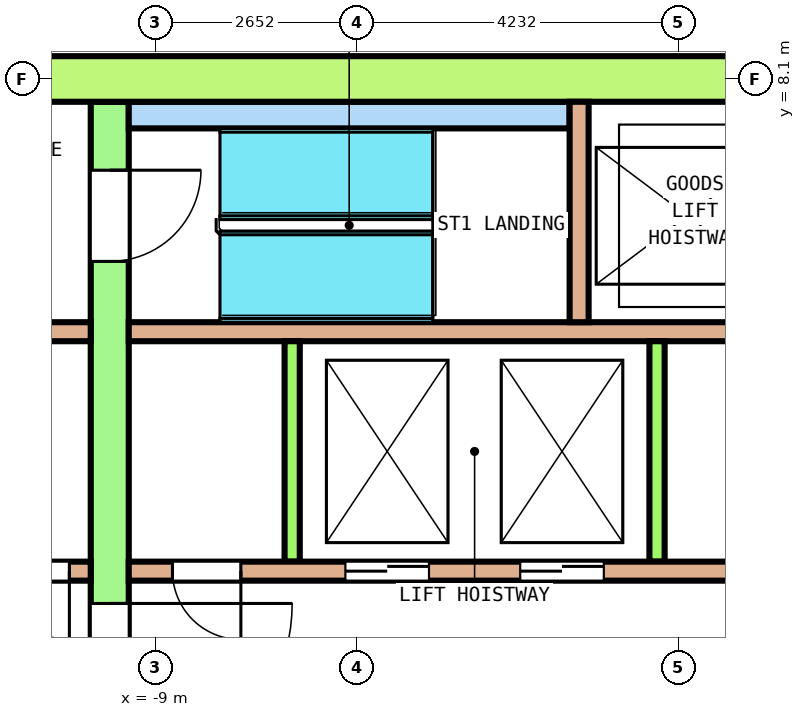
"""IFC4 building model, lengths in metres.
Left out: names, types, materials, properties, quantities, classifications, styles, units other than length and angle.
Written with IfcOpenShell. Run it as: python <this file> out.ifc"""

import sys

from ifc_helpers import new_model, si_unit, direction, frame, frame_2d, origin, place, context, subcontext, project, spatial, rectangle, extrude, element, fill, save


model = new_model("IFC4")
c1 = context("Model", 3, precision=1e-05, world=origin(), true_north=direction((0.0, 1.0)))
c2 = subcontext(c1, "Body", "Model", "MODEL_VIEW")
j1 = project(units=[si_unit("LENGTHUNIT", "METRE"), si_unit("PLANEANGLEUNIT", "RADIAN")], contexts=[c1])
p1 = place(None, origin())
s1 = spatial("IfcSite", under=j1, at=p1, CompositionType="ELEMENT")
p2 = place(p1, origin())
s2 = spatial("IfcBuilding", under=s1, at=p2, CompositionType="ELEMENT")
p3 = place(p2, frame((0.0, 0.0, 223.4)))
s3 = spatial("IfcBuildingStorey", under=s2, at=p3, CompositionType="ELEMENT", Elevation=223.4)
p4 = place(p3, frame((-13.5, 8.1, 0.0), z_axis=(0.0, 0.0, 1.0), x_axis=(1.0, 0.0, 0.0)))
e1 = element("IfcWall", 1, at=p4, inside=s3, PredefinedType="SHEAR", context=c2, shape_type="SweptSolid", body=[
    extrude(rectangle(XDim=27.0, YDim=0.6, at=frame_2d((13.5, 0.0))), origin(), (0.0, 0.0, 1.0), 3.7),
])
p5 = place(p4, frame((14.425, 0.0, 0.0)))
e2 = element("IfcOpeningElement", 2, at=p5, cuts=e1, PredefinedType="OPENING", context=c2, shape_type="SweptSolid", body=[
    extrude(rectangle(XDim=1.4, YDim=2.1, at=frame_2d((0.7, 1.05))), frame((0.0, 0.31, 0.0), z_axis=(0.0, -1.0, 0.0), x_axis=(1.0, 0.0, 0.0)), (0.0, 0.0, 1.0), 0.62),
])
p6 = place(p3, frame((-9.6, -7.8, 0.0), z_axis=(0.0, 0.0, 1.0), x_axis=(0.0, 1.0, 0.0)))
e3 = element("IfcWall", 3, at=p6, inside=s3, PredefinedType="SHEAR", context=c2, shape_type="SweptSolid", body=[
    extrude(rectangle(XDim=15.6, YDim=0.5, at=frame_2d((7.8, 0.0))), origin(), (0.0, 0.0, 1.0), 3.7),
])
p7 = place(p6, frame((6.6, 0.0, 0.0)))
e4 = element("IfcOpeningElement", 4, at=p7, cuts=e3, PredefinedType="OPENING", context=c2, shape_type="SweptSolid", body=[
    extrude(rectangle(XDim=2.4, YDim=2.1, at=frame_2d((1.2, 1.05))), frame((0.0, 0.26, 0.0), z_axis=(0.0, -1.0, 0.0), x_axis=(1.0, 0.0, 0.0)), (0.0, 0.0, 1.0), 0.52),
])
p8 = place(p6, frame((13.5, 0.0, 0.0)))
e5 = element("IfcOpeningElement", 5, at=p8, cuts=e3, PredefinedType="OPENING", context=c2, shape_type="SweptSolid", body=[
    extrude(rectangle(XDim=1.2, YDim=2.1, at=frame_2d((0.6, 1.05))), frame((0.0, 0.26, 0.0), z_axis=(0.0, -1.0, 0.0), x_axis=(1.0, 0.0, 0.0)), (0.0, 0.0, 1.0), 0.52),
])
p9 = place(p6, frame((0.9, 0.0, 0.0)))
e6 = element("IfcOpeningElement", 6, at=p9, cuts=e3, PredefinedType="OPENING", context=c2, shape_type="SweptSolid", body=[
    extrude(rectangle(XDim=1.2, YDim=2.1, at=frame_2d((0.6, 1.05))), frame((0.0, 0.26, 0.0), z_axis=(0.0, -1.0, 0.0), x_axis=(1.0, 0.0, 0.0)), (0.0, 0.0, 1.0), 0.52),
])
p10 = place(p3, frame((-12.9, 1.625, 0.0), z_axis=(0.0, 0.0, 1.0), x_axis=(1.0, 0.0, 0.0)))
e7 = element("IfcWall", 7, at=p10, inside=s3, PredefinedType="SOLIDWALL", context=c2, shape_type="SweptSolid", body=[
    extrude(rectangle(XDim=3.05, YDim=0.25, at=frame_2d((1.525, 0.0))), origin(), (0.0, 0.0, 1.0), 3.7),
])
p11 = place(p10, frame((0.281, 0.0, 0.0)))
e8 = element("IfcOpeningElement", 8, at=p11, cuts=e7, PredefinedType="OPENING", context=c2, shape_type="SweptSolid", body=[
    extrude(rectangle(XDim=0.9, YDim=2.1, at=frame_2d((0.45, 1.05))), frame((0.0, 0.135, 0.0), z_axis=(0.0, -1.0, 0.0), x_axis=(1.0, 0.0, 0.0)), (0.0, 0.0, 1.0), 0.27),
])
p12 = place(p10, frame((1.869, 0.0, 0.0)))
e9 = element("IfcOpeningElement", 9, at=p12, cuts=e7, PredefinedType="OPENING", context=c2, shape_type="SweptSolid", body=[
    extrude(rectangle(XDim=0.9, YDim=2.1, at=frame_2d((0.45, 1.05))), frame((0.0, 0.135, 0.0), z_axis=(0.0, -1.0, 0.0), x_axis=(1.0, 0.0, 0.0)), (0.0, 0.0, 1.0), 0.27),
])
p13 = place(p3, frame((-9.35, 1.625, 0.0), z_axis=(0.0, 0.0, 1.0), x_axis=(1.0, 0.0, 0.0)))
e10 = element("IfcWall", 10, at=p13, inside=s3, PredefinedType="SOLIDWALL", context=c2, shape_type="SweptSolid", body=[
    extrude(rectangle(XDim=18.7, YDim=0.25, at=frame_2d((9.35, 0.0))), origin(), (0.0, 0.0, 1.0), 3.7),
])
p14 = place(p13, frame((2.85, 0.0, 0.0)))
e11 = element("IfcOpeningElement", 11, at=p14, cuts=e10, PredefinedType="OPENING", context=c2, shape_type="SweptSolid", body=[
    extrude(rectangle(XDim=1.1, YDim=2.1, at=frame_2d((0.55, 1.05))), frame((0.0, 0.135, 0.0), z_axis=(0.0, -1.0, 0.0), x_axis=(1.0, 0.0, 0.0)), (0.0, 0.0, 1.0), 0.27),
])
p15 = place(p13, frame((5.15, 0.0, 0.0)))
e12 = element("IfcOpeningElement", 12, at=p15, cuts=e10, PredefinedType="OPENING", context=c2, shape_type="SweptSolid", body=[
    extrude(rectangle(XDim=1.1, YDim=2.1, at=frame_2d((0.55, 1.05))), frame((0.0, 0.135, 0.0), z_axis=(0.0, -1.0, 0.0), x_axis=(1.0, 0.0, 0.0)), (0.0, 0.0, 1.0), 0.27),
])
p16 = place(p13, frame((14.8, 0.0, 0.0)))
e13 = element("IfcOpeningElement", 13, at=p16, cuts=e10, PredefinedType="OPENING", context=c2, shape_type="SweptSolid", body=[
    extrude(rectangle(XDim=1.1, YDim=2.1, at=frame_2d((0.55, 1.05))), frame((0.0, 0.135, 0.0), z_axis=(0.0, -1.0, 0.0), x_axis=(1.0, 0.0, 0.0)), (0.0, 0.0, 1.0), 0.27),
])
p17 = place(p13, frame((0.575, 0.0, 0.0)))
e14 = element("IfcOpeningElement", 14, at=p17, cuts=e10, PredefinedType="OPENING", context=c2, shape_type="SweptSolid", body=[
    extrude(rectangle(XDim=0.9, YDim=2.1, at=frame_2d((0.45, 1.05))), frame((0.0, 0.135, 0.0), z_axis=(0.0, -1.0, 0.0), x_axis=(1.0, 0.0, 0.0)), (0.0, 0.0, 1.0), 0.27),
])
p18 = place(p13, frame((17.225, 0.0, 0.0)))
e15 = element("IfcOpeningElement", 15, at=p18, cuts=e10, PredefinedType="OPENING", context=c2, shape_type="SweptSolid", body=[
    extrude(rectangle(XDim=0.9, YDim=2.1, at=frame_2d((0.45, 1.05))), frame((0.0, 0.135, 0.0), z_axis=(0.0, -1.0, 0.0), x_axis=(1.0, 0.0, 0.0)), (0.0, 0.0, 1.0), 0.27),
])
p19 = place(p3, frame((-12.9, 4.775, 0.0), z_axis=(0.0, 0.0, 1.0), x_axis=(1.0, 0.0, 0.0)))
e16 = element("IfcWall", 16, at=p19, inside=s3, PredefinedType="SOLIDWALL", context=c2, shape_type="SweptSolid", body=[
    extrude(rectangle(XDim=3.05, YDim=0.25, at=frame_2d((1.525, 0.0))), origin(), (0.0, 0.0, 1.0), 3.7),
])
p20 = place(p3, frame((-9.35, 4.775, 0.0), z_axis=(0.0, 0.0, 1.0), x_axis=(1.0, 0.0, 0.0)))
e17 = element("IfcWall", 17, at=p20, inside=s3, PredefinedType="SOLIDWALL", context=c2, shape_type="SweptSolid", body=[
    extrude(rectangle(XDim=18.7, YDim=0.25, at=frame_2d((9.35, 0.0))), origin(), (0.0, 0.0, 1.0), 3.7),
])
for number, where, z_axis, x_axis in (
    (18, (-7.2, 1.75, 0.0), (0.0, 0.0, 1.0), (0.0, 1.0, 0.0)),
    (19, (-2.4, 1.75, 0.0), (0.0, 0.0, 1.0), (0.0, 1.0, 0.0)),
):
    element("IfcWall", number, at=place(p3, frame(where, z_axis=z_axis, x_axis=x_axis)), inside=s3, PredefinedType="SOLIDWALL", context=c2, shape_type="SweptSolid", body=[
        extrude(rectangle(XDim=2.9, YDim=0.2, at=frame_2d((1.45, 0.0))), origin(), (0.0, 0.0, 1.0), 3.7),
    ])
p21 = place(p3, frame((-9.35, 7.625, 0.0), z_axis=(0.0, 0.0, 1.0), x_axis=(1.0, 0.0, 0.0)))
e20 = element("IfcWall", 20, at=p21, inside=s3, PredefinedType="SOLIDWALL", context=c2, shape_type="SweptSolid", body=[
    extrude(rectangle(XDim=5.8, YDim=0.35, at=frame_2d((2.9, 0.0))), origin(), (0.0, 0.0, 1.0), 3.7),
])
p22 = place(p3, frame((-3.425, 4.9, 0.0), z_axis=(0.0, 0.0, 1.0), x_axis=(0.0, 1.0, 0.0)))
e21 = element("IfcWall", 21, at=p22, inside=s3, PredefinedType="SOLIDWALL", context=c2, shape_type="SweptSolid", body=[
    extrude(rectangle(XDim=2.9, YDim=0.25, at=frame_2d((1.45, 0.0))), origin(), (0.0, 0.0, 1.0), 3.7),
])
p23 = place(p14, origin())
e22 = element("IfcDoor", 22, at=p23, inside=s3, OperationType="DOUBLE_DOOR_SLIDING", PredefinedType="DOOR", context=c2, shape_type="SweptSolid", body=[
    extrude(rectangle(XDim=1.1, YDim=2.1, at=frame_2d((0.55, 1.05))), frame((0.0, 0.075, 0.0), z_axis=(0.0, -1.0, 0.0), x_axis=(1.0, 0.0, 0.0)), (0.0, 0.0, 1.0), 0.15),
])
fill(e11, e22)
p24 = place(p15, origin())
e23 = element("IfcDoor", 23, at=p24, inside=s3, OperationType="DOUBLE_DOOR_SLIDING", PredefinedType="DOOR", context=c2, shape_type="SweptSolid", body=[
    extrude(rectangle(XDim=1.1, YDim=2.1, at=frame_2d((0.55, 1.05))), frame((0.0, 0.075, 0.0), z_axis=(0.0, -1.0, 0.0), x_axis=(1.0, 0.0, 0.0)), (0.0, 0.0, 1.0), 0.15),
])
fill(e12, e23)
p25 = place(p7, origin())
e24 = element("IfcDoor", 24, at=p25, inside=s3, OperationType="DOUBLE_DOOR_SINGLE_SWING", PredefinedType="DOOR", context=c2, shape_type="SweptSolid", body=[
    extrude(rectangle(XDim=2.4, YDim=2.1, at=frame_2d((1.2, 1.05))), frame((0.0, 0.2, 0.0), z_axis=(0.0, -1.0, 0.0), x_axis=(1.0, 0.0, 0.0)), (0.0, 0.0, 1.0), 0.4),
])
fill(e4, e24)
p26 = place(p8, origin())
e25 = element("IfcDoor", 25, at=p26, inside=s3, OperationType="SINGLE_SWING_RIGHT", PredefinedType="DOOR", context=c2, shape_type="SweptSolid", body=[
    extrude(rectangle(XDim=1.2, YDim=2.1, at=frame_2d((0.6, 1.05))), frame((0.0, 0.2, 0.0), z_axis=(0.0, -1.0, 0.0), x_axis=(1.0, 0.0, 0.0)), (0.0, 0.0, 1.0), 0.4),
])
fill(e5, e25)
p27 = place(p12, origin())
e26 = element("IfcDoor", 26, at=p27, inside=s3, OperationType="SINGLE_SWING_RIGHT", PredefinedType="DOOR", context=c2, shape_type="SweptSolid", body=[
    extrude(rectangle(XDim=0.9, YDim=2.1, at=frame_2d((0.45, 1.05))), frame((0.0, 0.075, 0.0), z_axis=(0.0, -1.0, 0.0), x_axis=(1.0, 0.0, 0.0)), (0.0, 0.0, 1.0), 0.15),
])
fill(e9, e26)
p28 = place(p17, origin())
e27 = element("IfcDoor", 27, at=p28, inside=s3, OperationType="SINGLE_SWING_LEFT", PredefinedType="DOOR", context=c2, shape_type="SweptSolid", body=[
    extrude(rectangle(XDim=0.9, YDim=2.1, at=frame_2d((0.45, 1.05))), frame((0.0, 0.075, 0.0), z_axis=(0.0, -1.0, 0.0), x_axis=(1.0, 0.0, 0.0)), (0.0, 0.0, 1.0), 0.15),
])
fill(e14, e27)
save(model, sys.argv[1])
